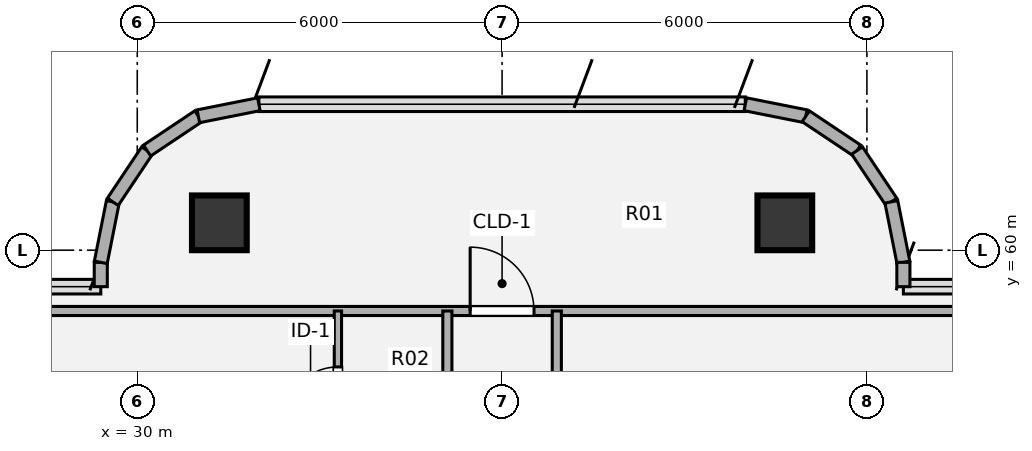
"""IFC4 building model, lengths in metres.
Left out: names, types, materials, properties, quantities, classifications, styles, units other than length and angle.
Written with IfcOpenShell. Run it as: python <this file> out.ifc"""

import sys

from ifc_helpers import new_model, si_unit, direction, frame, frame_2d, origin, origin_2d, place, context, subcontext, project, spatial, rectangle, hollow_circle, extrude, source, transform, mapped, element, fill, save


model = new_model("IFC4")
c1 = context("Model", 3, precision=1e-05, world=origin(), true_north=direction((0.0, 1.0)))
c2 = subcontext(c1, "Body", "Model", "MODEL_VIEW")
j1 = project(units=[si_unit("LENGTHUNIT", "METRE"), si_unit("PLANEANGLEUNIT", "RADIAN")], contexts=[c1])
p1 = place(None, origin())
s1 = spatial("IfcSite", under=j1, at=p1, CompositionType="ELEMENT")
p2 = place(p1, origin())
s2 = spatial("IfcBuilding", under=s1, at=p2, CompositionType="ELEMENT")
p3 = place(p2, frame((0.0, 0.0, 279.72)))
s3 = spatial("IfcBuildingStorey", under=s2, at=p3, CompositionType="ELEMENT", Elevation=279.72)
m1 = source(origin(), c2, "Body", "SweptSolid", [
    extrude(hollow_circle(Radius=0.45, WallThickness=0.032, at=origin_2d()), origin(), (0.0, 0.0, 1.0), 3.78),
])
for number, where, z_axis, x_axis in (
    (1, (31.35, 60.45, 0.0), (0.0, 0.0, 1.0), (1.0, 0.0, 0.0)),
    (2, (40.65, 60.45, 0.0), (0.0, 0.0, 1.0), (1.0, 0.0, 0.0)),
):
    element("IfcColumn", number, at=place(p3, frame(where, z_axis=z_axis, x_axis=x_axis)), inside=s3, PredefinedType="COLUMN", context=c2, shape_type="MappedRepresentation", body=[
        mapped(m1, transform((0.0, 0.0, 0.0), x_axis=(1.0, 0.0, 0.0), y_axis=(0.0, 1.0, 0.0), z_axis=(0.0, 0.0, 1.0), scale=1.0)),
    ])
p4 = place(p3, frame((29.4, 59.4, 0.0), z_axis=(0.0, 0.0, 1.0), x_axis=(0.0, 1.0, 0.0)))
e3 = element("IfcWall", 3, at=p4, inside=s3, PredefinedType="SOLIDWALL", context=c2, shape_type="SweptSolid", body=[
    extrude(rectangle(XDim=0.4, YDim=0.215, at=frame_2d((0.2, 0.0))), origin(), (0.0, 0.0, 1.0), 3.53),
])
p5 = place(p3, frame((29.4, 59.8, 0.0), z_axis=(0.0, 0.0, 1.0), x_axis=(0.195190360752, 0.980765376158, 0.0)))
e4 = element("IfcWall", 4, at=p5, inside=s3, PredefinedType="SOLIDWALL", context=c2, shape_type="SweptSolid", body=[
    extrude(rectangle(XDim=1.014, YDim=0.215, at=frame_2d((0.507, 0.0))), origin(), (0.0, 0.0, 1.0), 3.53),
])
p6 = place(p3, frame((29.598, 60.795, 0.0), z_axis=(0.0, 0.0, 1.0), x_axis=(0.555643898837, 0.831420385657, 0.0)))
e5 = element("IfcWall", 5, at=p6, inside=s3, PredefinedType="SOLIDWALL", context=c2, shape_type="SweptSolid", body=[
    extrude(rectangle(XDim=1.015, YDim=0.215, at=frame_2d((0.507, 0.0))), origin(), (0.0, 0.0, 1.0), 3.53),
])
p7 = place(p3, frame((30.162, 61.638, 0.0), z_axis=(0.0, 0.0, 1.0), x_axis=(0.831346067305, 0.555755086685, 0.0)))
e6 = element("IfcWall", 6, at=p7, inside=s3, PredefinedType="SOLIDWALL", context=c2, shape_type="SweptSolid", body=[
    extrude(rectangle(XDim=1.014, YDim=0.215, at=frame_2d((0.507, 0.0))), origin(), (0.0, 0.0, 1.0), 3.53),
])
for number, where, z_axis, x_axis in (
    (7, (31.005, 62.202, 0.0), (0.0, 0.0, 1.0), (0.981, 0.195, 0.0)),
    (8, (40.0, 62.4, 0.0), (0.0, 0.0, 1.0), (0.981, -0.195, 0.0)),
):
    element("IfcWall", number, at=place(p3, frame(where, z_axis=z_axis, x_axis=x_axis)), inside=s3, PredefinedType="SOLIDWALL", context=c2, shape_type="SweptSolid", body=[
        extrude(rectangle(XDim=1.015, YDim=0.215, at=frame_2d((0.507, 0.0))), origin(), (0.0, 0.0, 1.0), 3.53),
    ])
p8 = place(p3, frame((40.995, 62.202, 0.0), z_axis=(0.0, 0.0, 1.0), x_axis=(0.831346067305, -0.555755086685, 0.0)))
e9 = element("IfcWall", 9, at=p8, inside=s3, PredefinedType="SOLIDWALL", context=c2, shape_type="SweptSolid", body=[
    extrude(rectangle(XDim=1.014, YDim=0.215, at=frame_2d((0.507, 0.0))), origin(), (0.0, 0.0, 1.0), 3.53),
])
p9 = place(p3, frame((41.838, 61.638, 0.0), z_axis=(0.0, 0.0, 1.0), x_axis=(0.555643898837, -0.831420385657, 0.0)))
e10 = element("IfcWall", 10, at=p9, inside=s3, PredefinedType="SOLIDWALL", context=c2, shape_type="SweptSolid", body=[
    extrude(rectangle(XDim=1.015, YDim=0.215, at=frame_2d((0.507, 0.0))), origin(), (0.0, 0.0, 1.0), 3.53),
])
p10 = place(p3, frame((42.402, 60.795, 0.0), z_axis=(0.0, 0.0, 1.0), x_axis=(0.195190360752, -0.980765376158, 0.0)))
e11 = element("IfcWall", 11, at=p10, inside=s3, PredefinedType="SOLIDWALL", context=c2, shape_type="SweptSolid", body=[
    extrude(rectangle(XDim=1.014, YDim=0.215, at=frame_2d((0.507, 0.0))), origin(), (0.0, 0.0, 1.0), 3.53),
])
p11 = place(p3, frame((42.6, 59.8, 0.0), z_axis=(0.0, 0.0, 1.0), x_axis=(0.0, -1.0, 0.0)))
e12 = element("IfcWall", 12, at=p11, inside=s3, PredefinedType="SOLIDWALL", context=c2, shape_type="SweptSolid", body=[
    extrude(rectangle(XDim=0.4, YDim=0.215, at=frame_2d((0.2, 0.0))), origin(), (0.0, 0.0, 1.0), 3.53),
])
p12 = place(p3, frame((27.1, 59.0, 0.0), z_axis=(0.0, 0.0, 1.0), x_axis=(1.0, 0.0, 0.0)))
e13 = element("IfcWall", 13, at=p12, inside=s3, PredefinedType="PARTITIONING", context=c2, shape_type="SweptSolid", body=[
    extrude(rectangle(XDim=17.8, YDim=0.15, at=frame_2d((8.9, 0.0))), origin(), (0.0, 0.0, 1.0), 3.308),
])
p13 = place(p12, frame((8.375, 0.0, 0.0)))
e14 = element("IfcOpeningElement", 14, at=p13, cuts=e13, PredefinedType="OPENING", context=c2, shape_type="SweptSolid", body=[
    extrude(rectangle(XDim=1.05, YDim=2.1, at=origin_2d()), frame((0.525, 0.085, 1.05), z_axis=(0.0, -1.0, 0.0), x_axis=(1.0, 0.0, 0.0)), (0.0, 0.0, 1.0), 0.17),
])
p14 = place(p3, frame((33.3, 56.6, 0.0), z_axis=(0.0, 0.0, 1.0), x_axis=(0.0, 1.0, 0.0)))
e15 = element("IfcWall", 15, at=p14, inside=s3, PredefinedType="PARTITIONING", context=c2, shape_type="SweptSolid", body=[
    extrude(rectangle(XDim=2.4, YDim=0.12, at=frame_2d((1.2, 0.0))), origin(), (0.0, 0.0, 1.0), 3.5),
])
p15 = place(p14, frame((0.62, 0.0, 0.0)))
e16 = element("IfcOpeningElement", 16, at=p15, cuts=e15, PredefinedType="OPENING", context=c2, shape_type="SweptSolid", body=[
    extrude(rectangle(XDim=0.86, YDim=2.1, at=origin_2d()), frame((0.43, 0.07, 1.05), z_axis=(0.0, -1.0, 0.0), x_axis=(1.0, 0.0, 0.0)), (0.0, 0.0, 1.0), 0.14),
])
p16 = place(p3, frame((35.1, 56.6, 0.0), z_axis=(0.0, 0.0, 1.0), x_axis=(0.0, 1.0, 0.0)))
e17 = element("IfcWall", 17, at=p16, inside=s3, PredefinedType="PARTITIONING", context=c2, shape_type="SweptSolid", body=[
    extrude(rectangle(XDim=2.4, YDim=0.15, at=frame_2d((1.2, 0.0))), origin(), (0.0, 0.0, 1.0), 3.5),
])
p17 = place(p3, frame((36.9, 51.7, 0.0), z_axis=(0.0, 0.0, 1.0), x_axis=(0.0, 1.0, 0.0)))
e18 = element("IfcWall", 18, at=p17, inside=s3, PredefinedType="PARTITIONING", context=c2, shape_type="SweptSolid", body=[
    extrude(rectangle(XDim=7.3, YDim=0.15, at=frame_2d((3.65, 0.0))), origin(), (0.0, 0.0, 1.0), 3.5),
])
p18 = place(p17, frame((3.025, 0.0, 0.0)))
e19 = element("IfcOpeningElement", 19, at=p18, cuts=e18, PredefinedType="OPENING", context=c2, shape_type="SweptSolid", body=[
    extrude(rectangle(XDim=1.05, YDim=2.1, at=origin_2d()), frame((0.525, 0.085, 1.05), z_axis=(0.0, -1.0, 0.0), x_axis=(1.0, 0.0, 0.0)), (0.0, 0.0, 1.0), 0.17),
])
m2 = source(origin(), c2, "Body", "SweptSolid", [
    extrude(rectangle(XDim=1.05, YDim=2.1, at=origin_2d()), frame((0.525, 0.025, 1.05), z_axis=(0.0, -1.0, 0.0), x_axis=(1.0, 0.0, 0.0)), (0.0, 0.0, 1.0), 0.05),
])
p19 = place(p13, origin())
e20 = element("IfcDoor", 20, at=p19, inside=s3, OperationType="SINGLE_SWING_LEFT", PredefinedType="DOOR", context=c2, shape_type="MappedRepresentation", body=[
    mapped(m2, transform((0.0, 0.0, 0.0), x_axis=(1.0, 0.0, 0.0), y_axis=(0.0, 1.0, 0.0), z_axis=(0.0, 0.0, 1.0), scale=1.0)),
])
fill(e14, e20)
m3 = source(origin(), c2, "Body", "SweptSolid", [
    extrude(rectangle(XDim=0.86, YDim=2.1, at=origin_2d()), frame((0.43, 0.025, 1.05), z_axis=(0.0, -1.0, 0.0), x_axis=(1.0, 0.0, 0.0)), (0.0, 0.0, 1.0), 0.05),
])
p20 = place(p15, origin())
e21 = element("IfcDoor", 21, at=p20, inside=s3, OperationType="SINGLE_SWING_LEFT", PredefinedType="DOOR", context=c2, shape_type="MappedRepresentation", body=[
    mapped(m3, transform((0.0, 0.0, 0.0), x_axis=(1.0, 0.0, 0.0), y_axis=(0.0, 1.0, 0.0), z_axis=(0.0, 0.0, 1.0), scale=1.0)),
])
fill(e16, e21)
save(model, sys.argv[1])
